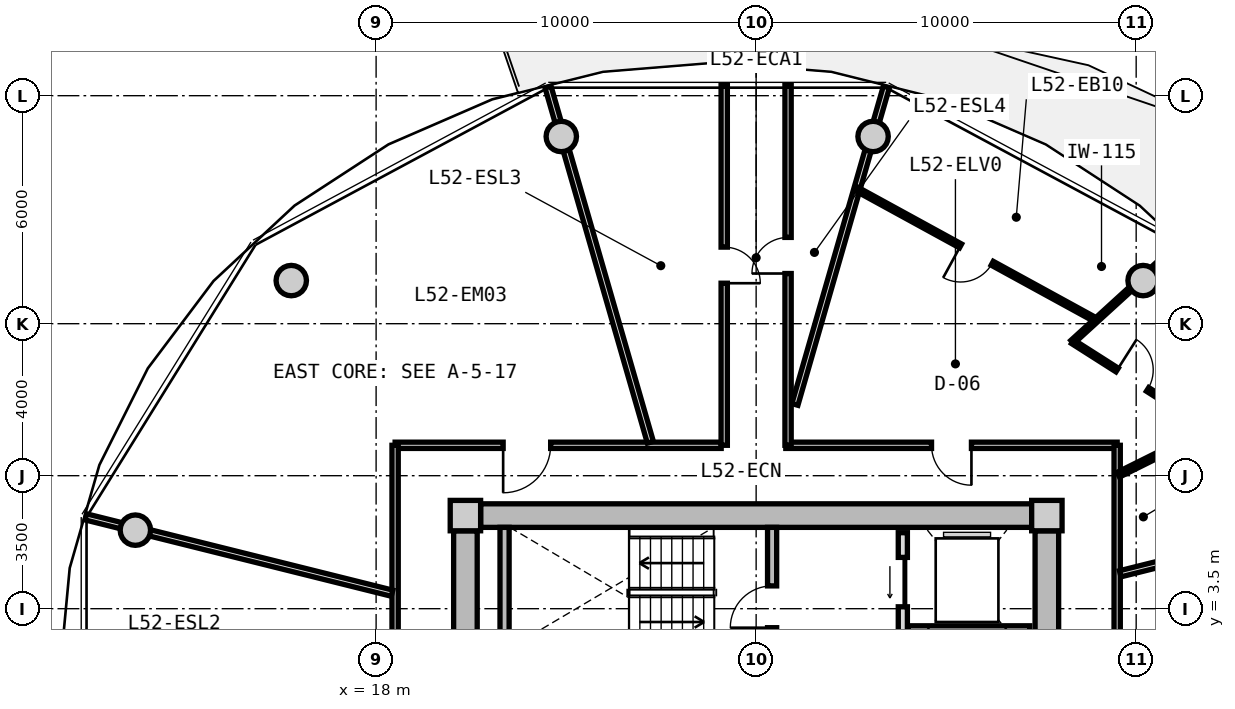
"""IFC4 building model, lengths in metres.
Left out: names, types, materials, properties, quantities, classifications, styles, units other than length and angle.
Written with IfcOpenShell. Run it as: python <this file> out.ifc"""

import sys

from ifc_helpers import new_model, si_unit, direction, frame, frame_2d, origin, origin_2d, place, context, subcontext, project, spatial, rectangle, circle, extrude, source, transform, mapped, element, fill, save


model = new_model("IFC4")
c1 = context("Model", 3, precision=1e-05, world=origin(), true_north=direction((0.0, 1.0)))
c2 = subcontext(c1, "Body", "Model", "MODEL_VIEW")
j1 = project(units=[si_unit("LENGTHUNIT", "METRE"), si_unit("PLANEANGLEUNIT", "RADIAN")], contexts=[c1])
p1 = place(None, origin())
s1 = spatial("IfcSite", under=j1, at=p1, CompositionType="ELEMENT")
p2 = place(p1, origin())
s2 = spatial("IfcBuilding", under=s1, at=p2, CompositionType="ELEMENT")
p3 = place(p2, frame((0.0, 0.0, 167.85)))
s3 = spatial("IfcBuildingStorey", under=s2, at=p3, CompositionType="ELEMENT", Elevation=167.85)
m1 = source(origin(), c2, "Body", "SweptSolid", [
    extrude(rectangle(XDim=0.8, YDim=0.8, at=origin_2d()), origin(), (0.0, 0.0, 1.0), 3.05),
])
for number, where, z_axis, x_axis in (
    (1, (35.65, 5.95, 0.0), (0.0, 0.0, 1.0), (1.0, 0.0, 0.0)),
    (2, (20.35, 5.95, 0.0), (0.0, 0.0, 1.0), (1.0, 0.0, 0.0)),
):
    element("IfcColumn", number, at=place(p3, frame(where, z_axis=z_axis, x_axis=x_axis)), inside=s3, PredefinedType="COLUMN", context=c2, shape_type="MappedRepresentation", body=[
        mapped(m1, transform((0.0, 0.0, 0.0), x_axis=(1.0, 0.0, 0.0), y_axis=(0.0, 1.0, 0.0), z_axis=(0.0, 0.0, 1.0), scale=1.0)),
    ])
m2 = source(origin(), c2, "Body", "SweptSolid", [
    extrude(rectangle(XDim=14.5, YDim=0.62, at=frame_2d((7.25, 0.0))), origin(), (0.0, 0.0, 1.0), 2.81),
])
p4 = place(p3, frame((20.75, 5.95, 0.0), z_axis=(0.0, 0.0, 1.0), x_axis=(1.0, 0.0, 0.0)))
e3 = element("IfcWall", 3, at=p4, inside=s3, PredefinedType="SHEAR", context=c2, shape_type="MappedRepresentation", body=[
    mapped(m2, transform((0.0, 0.0, 0.0), x_axis=(1.0, 0.0, 0.0), y_axis=(0.0, 1.0, 0.0), z_axis=(0.0, 0.0, 1.0), scale=1.0)),
])
m3 = source(origin(), c2, "Body", "SweptSolid", [
    extrude(rectangle(XDim=11.1, YDim=0.62, at=frame_2d((5.55, 0.0))), origin(), (0.0, 0.0, 1.0), 2.81),
])
p5 = place(p3, frame((20.35, -5.55, 0.0), z_axis=(0.0, 0.0, 1.0), x_axis=(0.0, 1.0, 0.0)))
e4 = element("IfcWall", 4, at=p5, inside=s3, PredefinedType="SHEAR", context=c2, shape_type="MappedRepresentation", body=[
    mapped(m3, transform((0.0, 0.0, 0.0), x_axis=(1.0, 0.0, 0.0), y_axis=(0.0, 1.0, 0.0), z_axis=(0.0, 0.0, 1.0), scale=1.0)),
])
p6 = place(p5, frame((3.8, 0.0, 0.0)))
e5 = element("IfcOpeningElement", 5, at=p6, cuts=e4, PredefinedType="OPENING", context=c2, shape_type="SweptSolid", body=[
    extrude(rectangle(XDim=1.2, YDim=2.15, at=frame_2d((0.6, 1.075))), frame((0.0, 0.32, 0.0), z_axis=(0.0, -1.0, 0.0), x_axis=(1.0, 0.0, 0.0)), (0.0, 0.0, 1.0), 0.64),
])
p7 = place(p3, frame((35.65, 5.55, 0.0), z_axis=(0.0, 0.0, 1.0), x_axis=(0.0, -1.0, 0.0)))
e6 = element("IfcWall", 6, at=p7, inside=s3, PredefinedType="SHEAR", context=c2, shape_type="MappedRepresentation", body=[
    mapped(m3, transform((0.0, 0.0, 0.0), x_axis=(1.0, 0.0, 0.0), y_axis=(0.0, 1.0, 0.0), z_axis=(0.0, 0.0, 1.0), scale=1.0)),
])
p8 = place(p7, frame((5.65, 0.0, 0.0)))
e7 = element("IfcOpeningElement", 7, at=p8, cuts=e6, PredefinedType="OPENING", context=c2, shape_type="SweptSolid", body=[
    extrude(rectangle(XDim=1.2, YDim=2.15, at=frame_2d((0.6, 1.075))), frame((0.0, 0.32, 0.0), z_axis=(0.0, -1.0, 0.0), x_axis=(1.0, 0.0, 0.0)), (0.0, 0.0, 1.0), 0.64),
])
p9 = place(p7, frame((9.3, 0.0, 0.0)))
e8 = element("IfcOpeningElement", 8, at=p9, cuts=e6, PredefinedType="OPENING", context=c2, shape_type="SweptSolid", body=[
    extrude(rectangle(XDim=1.0, YDim=2.1, at=frame_2d((0.5, 1.05))), frame((0.0, 0.32, 0.0), z_axis=(0.0, -1.0, 0.0), x_axis=(1.0, 0.0, 0.0)), (0.0, 0.0, 1.0), 0.64),
])
m4 = source(origin(), c2, "Body", "SweptSolid", [
    extrude(circle(Radius=0.4, at=origin_2d()), origin(), (0.0, 0.0, 1.0), 3.05),
])
for number, where, z_axis, x_axis in (
    (9, (38.183, 12.135, 0.0), (0.0, 0.0, 1.0), (1.0, 0.0, 0.0)),
    (10, (31.077, 15.926, 0.0), (0.0, 0.0, 1.0), (1.0, 0.0, 0.0)),
    (11, (22.873, 15.926, 0.0), (0.0, 0.0, 1.0), (1.0, 0.0, 0.0)),
    (12, (15.767, 12.135, 0.0), (0.0, 0.0, 1.0), (1.0, 0.0, 0.0)),
    (13, (11.665, 5.567, 0.0), (0.0, 0.0, 1.0), (1.0, 0.0, 0.0)),
):
    element("IfcColumn", number, at=place(p3, frame(where, z_axis=z_axis, x_axis=x_axis)), inside=s3, PredefinedType="COLUMN", context=c2, shape_type="MappedRepresentation", body=[
        mapped(m4, transform((0.0, 0.0, 0.0), x_axis=(1.0, 0.0, 0.0), y_axis=(0.0, 1.0, 0.0), z_axis=(0.0, 0.0, 1.0), scale=1.0)),
    ])
m5 = source(origin(), c2, "Body", "SweptSolid", [
    extrude(rectangle(XDim=3.19, YDim=0.24, at=frame_2d((1.595, 0.0))), origin(), (0.0, 0.0, 1.0), 2.81),
])
p10 = place(p3, frame((21.38, 2.45, 0.0), z_axis=(0.0, 0.0, 1.0), x_axis=(0.0, 1.0, 0.0)))
e14 = element("IfcWall", 14, at=p10, inside=s3, PredefinedType="PARTITIONING", context=c2, shape_type="MappedRepresentation", body=[
    mapped(m5, transform((0.0, 0.0, 0.0), x_axis=(1.0, 0.0, 0.0), y_axis=(0.0, 1.0, 0.0), z_axis=(0.0, 0.0, 1.0), scale=1.0)),
])
p11 = place(p3, frame((28.42, 2.45, 0.0), z_axis=(0.0, 0.0, 1.0), x_axis=(0.0, 1.0, 0.0)))
e15 = element("IfcWall", 15, at=p11, inside=s3, PredefinedType="PARTITIONING", context=c2, shape_type="MappedRepresentation", body=[
    mapped(m5, transform((0.0, 0.0, 0.0), x_axis=(1.0, 0.0, 0.0), y_axis=(0.0, 1.0, 0.0), z_axis=(0.0, 0.0, 1.0), scale=1.0)),
])
p12 = place(p11, frame((0.55, 0.0, 0.0)))
e16 = element("IfcOpeningElement", 16, at=p12, cuts=e15, PredefinedType="OPENING", context=c2, shape_type="SweptSolid", body=[
    extrude(rectangle(XDim=1.1, YDim=2.15, at=frame_2d((0.55, 1.075))), frame((0.0, 0.13, 0.0), z_axis=(0.0, -1.0, 0.0), x_axis=(1.0, 0.0, 0.0)), (0.0, 0.0, 1.0), 0.26),
])
m6 = source(origin(), c2, "Body", "SweptSolid", [
    extrude(rectangle(XDim=5.0, YDim=0.24, at=frame_2d((2.5, 0.0))), origin(), (0.0, 0.0, 1.0), 2.795),
])
p13 = place(p3, frame((31.86, 0.5, 0.0), z_axis=(0.0, 0.0, 1.0), x_axis=(0.0, 1.0, 0.0)))
e17 = element("IfcWall", 17, at=p13, inside=s3, PredefinedType="PARTITIONING", context=c2, shape_type="MappedRepresentation", body=[
    mapped(m6, transform((0.0, 0.0, 0.0), x_axis=(1.0, 0.0, 0.0), y_axis=(0.0, 1.0, 0.0), z_axis=(0.0, 0.0, 1.0), scale=1.0)),
])
p14 = place(p13, frame((3.05, 0.0, 0.0)))
e18 = element("IfcOpeningElement", 18, at=p14, cuts=e17, PredefinedType="OPENING", context=c2, shape_type="SweptSolid", body=[
    extrude(rectangle(XDim=1.3, YDim=2.2, at=frame_2d((0.65, 1.1))), frame((0.0, 0.13, 0.0), z_axis=(0.0, -1.0, 0.0), x_axis=(1.0, 0.0, 0.0)), (0.0, 0.0, 1.0), 0.26),
])
p15 = place(p13, frame((0.55, 0.0, 0.0)))
e19 = element("IfcOpeningElement", 19, at=p15, cuts=e17, PredefinedType="OPENING", context=c2, shape_type="SweptSolid", body=[
    extrude(rectangle(XDim=1.3, YDim=2.2, at=frame_2d((0.65, 1.1))), frame((0.0, 0.13, 0.0), z_axis=(0.0, -1.0, 0.0), x_axis=(1.0, 0.0, 0.0)), (0.0, 0.0, 1.0), 0.26),
])
m7 = source(origin(), c2, "Body", "SweptSolid", [
    extrude(rectangle(XDim=3.2, YDim=0.2, at=frame_2d((1.6, 0.0))), origin(), (0.0, 0.0, 1.0), 2.795),
])
p16 = place(p3, frame((32.0, 2.95, 0.0), z_axis=(0.0, 0.0, 1.0), x_axis=(1.0, 0.0, 0.0)))
e20 = element("IfcWall", 20, at=p16, inside=s3, PredefinedType="PARTITIONING", context=c2, shape_type="MappedRepresentation", body=[
    mapped(m7, transform((0.0, 0.0, 0.0), x_axis=(1.0, 0.0, 0.0), y_axis=(0.0, 1.0, 0.0), z_axis=(0.0, 0.0, 1.0), scale=1.0)),
])
m8 = source(origin(), c2, "Body", "SweptSolid", [
    extrude(rectangle(XDim=8.58, YDim=0.165, at=frame_2d((4.29, 0.0))), origin(), (0.0, 0.0, 1.0), 2.795),
])
p17 = place(p3, frame((18.5, 7.8, 0.0), z_axis=(0.0, 0.0, 1.0), x_axis=(1.0, 0.0, 0.0)))
e21 = element("IfcWall", 21, at=p17, inside=s3, PredefinedType="PARTITIONING", context=c2, shape_type="MappedRepresentation", body=[
    mapped(m8, transform((0.0, 0.0, 0.0), x_axis=(1.0, 0.0, 0.0), y_axis=(0.0, 1.0, 0.0), z_axis=(0.0, 0.0, 1.0), scale=1.0)),
])
p18 = place(p17, frame((2.843, 0.0, 0.0)))
e22 = element("IfcOpeningElement", 22, at=p18, cuts=e21, PredefinedType="OPENING", context=c2, shape_type="SweptSolid", body=[
    extrude(rectangle(XDim=1.25, YDim=2.2, at=frame_2d((0.625, 1.1))), frame((0.0, 0.093, 0.0), z_axis=(0.0, -1.0, 0.0), x_axis=(1.0, 0.0, 0.0)), (0.0, 0.0, 1.0), 0.185),
])
m9 = source(origin(), c2, "Body", "SweptSolid", [
    extrude(rectangle(XDim=8.719, YDim=0.165, at=frame_2d((4.36, 0.0))), origin(), (0.0, 0.0, 1.0), 2.795),
])
p19 = place(p3, frame((28.781, 7.8, 0.0), z_axis=(0.0, 0.0, 1.0), x_axis=(1.0, 0.0, 0.0)))
e23 = element("IfcWall", 23, at=p19, inside=s3, PredefinedType="PARTITIONING", context=c2, shape_type="MappedRepresentation", body=[
    mapped(m9, transform((0.0, 0.0, 0.0), x_axis=(1.0, 0.0, 0.0), y_axis=(0.0, 1.0, 0.0), z_axis=(0.0, 0.0, 1.0), scale=1.0)),
])
p20 = place(p19, frame((3.835, 0.0, 0.0)))
e24 = element("IfcOpeningElement", 24, at=p20, cuts=e23, PredefinedType="OPENING", context=c2, shape_type="SweptSolid", body=[
    extrude(rectangle(XDim=1.05, YDim=2.15, at=frame_2d((0.525, 1.075))), frame((0.0, 0.093, 0.0), z_axis=(0.0, -1.0, 0.0), x_axis=(1.0, 0.0, 0.0)), (0.0, 0.0, 1.0), 0.185),
])
m10 = source(origin(), c2, "Body", "SweptSolid", [
    extrude(rectangle(XDim=6.88, YDim=0.165, at=frame_2d((3.44, 0.0))), origin(), (0.0, 0.0, 1.0), 2.795),
])
for number, where, z_axis, x_axis in (
    (25, (18.5, 0.92, 0.0), (0.0, 0.0, 1.0), (0.0, 1.0, 0.0)),
    (26, (37.5, 7.8, 0.0), (0.0, 0.0, 1.0), (0.0, -1.0, 0.0)),
):
    element("IfcWall", number, at=place(p3, frame(where, z_axis=z_axis, x_axis=x_axis)), inside=s3, PredefinedType="PARTITIONING", context=c2, shape_type="MappedRepresentation", body=[
        mapped(m10, transform((0.0, 0.0, 0.0), x_axis=(1.0, 0.0, 0.0), y_axis=(0.0, 1.0, 0.0), z_axis=(0.0, 0.0, 1.0), scale=1.0)),
    ])
m11 = source(origin(), c2, "Body", "SweptSolid", [
    extrude(rectangle(XDim=8.695, YDim=0.165, at=frame_2d((4.348, 0.0))), origin(), (0.0, 0.0, 1.0), 2.345),
])
p21 = place(p3, frame((29.02, 8.875, 0.0), z_axis=(0.0, 0.0, 1.0), x_axis=(0.276797231892, 0.960928349263, 0.0)))
e27 = element("IfcWall", 27, at=p21, inside=s3, PredefinedType="PARTITIONING", context=c2, shape_type="MappedRepresentation", body=[
    mapped(m11, transform((0.0, 0.0, 0.0), x_axis=(1.0, 0.0, 0.0), y_axis=(0.0, 1.0, 0.0), z_axis=(0.0, 0.0, 1.0), scale=1.0)),
])
m12 = source(origin(), c2, "Body", "SweptSolid", [
    extrude(rectangle(XDim=9.73, YDim=0.165, at=frame_2d((4.865, 0.0))), origin(), (0.0, 0.0, 1.0), 2.345),
])
p22 = place(p3, frame((25.217, 7.88, 0.0), z_axis=(0.0, 0.0, 1.0), x_axis=(-0.27679492614, 0.960929013436, 0.0)))
e28 = element("IfcWall", 28, at=p22, inside=s3, PredefinedType="PARTITIONING", context=c2, shape_type="MappedRepresentation", body=[
    mapped(m12, transform((0.0, 0.0, 0.0), x_axis=(1.0, 0.0, 0.0), y_axis=(0.0, 1.0, 0.0), z_axis=(0.0, 0.0, 1.0), scale=1.0)),
])
m13 = source(origin(), c2, "Body", "SweptSolid", [
    extrude(rectangle(XDim=8.305, YDim=0.165, at=frame_2d((4.153, 0.0))), origin(), (0.0, 0.0, 1.0), 2.345),
])
p23 = place(p3, frame((18.42, 3.908, 0.0), z_axis=(0.0, 0.0, 1.0), x_axis=(-0.970309994378, 0.241864662175, 0.0)))
e29 = element("IfcWall", 29, at=p23, inside=s3, PredefinedType="PARTITIONING", context=c2, shape_type="MappedRepresentation", body=[
    mapped(m13, transform((0.0, 0.0, 0.0), x_axis=(1.0, 0.0, 0.0), y_axis=(0.0, 1.0, 0.0), z_axis=(0.0, 0.0, 1.0), scale=1.0)),
])
m14 = source(origin(), c2, "Body", "SweptSolid", [
    extrude(rectangle(XDim=6.193, YDim=0.165, at=frame_2d((3.096, 0.0))), origin(), (0.0, 0.0, 1.0), 2.345),
])
p24 = place(p3, frame((37.58, 4.419, 0.0), z_axis=(0.0, 0.0, 1.0), x_axis=(0.970309243466, 0.241867674657, 0.0)))
e30 = element("IfcWall", 30, at=p24, inside=s3, PredefinedType="PARTITIONING", context=c2, shape_type="MappedRepresentation", body=[
    mapped(m14, transform((0.0, 0.0, 0.0), x_axis=(1.0, 0.0, 0.0), y_axis=(0.0, 1.0, 0.0), z_axis=(0.0, 0.0, 1.0), scale=1.0)),
])
m15 = source(origin(), c2, "Body", "SweptSolid", [
    extrude(rectangle(XDim=9.48, YDim=0.165, at=frame_2d((4.74, 0.0))), origin(), (0.0, 0.0, 1.0), 2.795),
])
p25 = place(p3, frame((27.16, 7.8, 0.0), z_axis=(0.0, 0.0, 1.0), x_axis=(0.0, 1.0, 0.0)))
e31 = element("IfcWall", 31, at=p25, inside=s3, PredefinedType="PARTITIONING", context=c2, shape_type="MappedRepresentation", body=[
    mapped(m15, transform((0.0, 0.0, 0.0), x_axis=(1.0, 0.0, 0.0), y_axis=(0.0, 1.0, 0.0), z_axis=(0.0, 0.0, 1.0), scale=1.0)),
])
p26 = place(p25, frame((4.265, 0.0, 0.0)))
e32 = element("IfcOpeningElement", 32, at=p26, cuts=e31, PredefinedType="OPENING", context=c2, shape_type="SweptSolid", body=[
    extrude(rectangle(XDim=0.95, YDim=2.1, at=frame_2d((0.475, 1.05))), frame((0.0, 0.093, 0.0), z_axis=(0.0, -1.0, 0.0), x_axis=(1.0, 0.0, 0.0)), (0.0, 0.0, 1.0), 0.185),
])
p27 = place(p3, frame((28.84, 17.28, 0.0), z_axis=(0.0, 0.0, 1.0), x_axis=(0.0, -1.0, 0.0)))
e33 = element("IfcWall", 33, at=p27, inside=s3, PredefinedType="PARTITIONING", context=c2, shape_type="MappedRepresentation", body=[
    mapped(m15, transform((0.0, 0.0, 0.0), x_axis=(1.0, 0.0, 0.0), y_axis=(0.0, 1.0, 0.0), z_axis=(0.0, 0.0, 1.0), scale=1.0)),
])
p28 = place(p27, frame((4.01, 0.0, 0.0)))
e34 = element("IfcOpeningElement", 34, at=p28, cuts=e33, PredefinedType="OPENING", context=c2, shape_type="SweptSolid", body=[
    extrude(rectangle(XDim=0.95, YDim=2.1, at=frame_2d((0.475, 1.05))), frame((0.0, 0.093, 0.0), z_axis=(0.0, -1.0, 0.0), x_axis=(1.0, 0.0, 0.0)), (0.0, 0.0, 1.0), 0.185),
])
m16 = source(origin(), c2, "Body", "SweptSolid", [
    extrude(rectangle(XDim=7.167, YDim=0.115, at=frame_2d((3.583, 0.0))), origin(), (0.0, 0.0, 1.0), 2.795),
])
p29 = place(p3, frame((36.939, 11.098, 0.0), z_axis=(0.0, 0.0, 1.0), x_axis=(-0.8771628907, 0.480192943699, 0.0)))
e35 = element("IfcWall", 35, at=p29, inside=s3, PredefinedType="PARTITIONING", context=c2, shape_type="MappedRepresentation", body=[
    mapped(m16, transform((0.0, 0.0, 0.0), x_axis=(1.0, 0.0, 0.0), y_axis=(0.0, 1.0, 0.0), z_axis=(0.0, 0.0, 1.0), scale=1.0)),
])
p30 = place(p29, frame((3.108, 0.0, 0.0)))
e36 = element("IfcOpeningElement", 36, at=p30, cuts=e35, PredefinedType="OPENING", context=c2, shape_type="SweptSolid", body=[
    extrude(rectangle(XDim=0.95, YDim=2.1, at=frame_2d((0.475, 1.05))), frame((0.0, 0.067, 0.0), z_axis=(0.0, -1.0, 0.0), x_axis=(1.0, 0.0, 0.0)), (0.0, 0.0, 1.0), 0.135),
])
m17 = source(origin(), c2, "Body", "SweptSolid", [
    extrude(rectangle(XDim=3.814, YDim=0.115, at=frame_2d((1.907, 0.0))), origin(), (0.0, 0.0, 1.0), 2.435),
])
p31 = place(p3, frame((36.319, 10.518, 0.0), z_axis=(0.0, 0.0, 1.0), x_axis=(0.73871962024, 0.674012850524, 0.0)))
e37 = element("IfcWall", 37, at=p31, inside=s3, PredefinedType="PARTITIONING", context=c2, shape_type="MappedRepresentation", body=[
    mapped(m17, transform((0.0, 0.0, 0.0), x_axis=(1.0, 0.0, 0.0), y_axis=(0.0, 1.0, 0.0), z_axis=(0.0, 0.0, 1.0), scale=1.0)),
])
m18 = source(origin(), c2, "Body", "SweptSolid", [
    extrude(rectangle(XDim=1.601, YDim=0.14, at=frame_2d((0.801, 0.0))), origin(), (0.0, 0.0, 1.0), 2.795),
])
p32 = place(p3, frame((37.53, 7.026, 0.0), z_axis=(0.0, 0.0, 1.0), x_axis=(0.895279369592, 0.445505163138, 0.0)))
e38 = element("IfcWall", 38, at=p32, inside=s3, PredefinedType="PARTITIONING", context=c2, shape_type="MappedRepresentation", body=[
    mapped(m18, transform((0.0, 0.0, 0.0), x_axis=(1.0, 0.0, 0.0), y_axis=(0.0, 1.0, 0.0), z_axis=(0.0, 0.0, 1.0), scale=1.0)),
])
m19 = source(origin(), c2, "Body", "SweptSolid", [
    extrude(rectangle(XDim=3.725, YDim=0.115, at=frame_2d((1.863, 0.0))), origin(), (0.0, 0.0, 1.0), 2.795),
])
p33 = place(p3, frame((39.471, 8.525, 0.0), z_axis=(0.0, 0.0, 1.0), x_axis=(-0.843453635564, 0.537201977523, 0.0)))
e39 = element("IfcWall", 39, at=p33, inside=s3, PredefinedType="PARTITIONING", context=c2, shape_type="MappedRepresentation", body=[
    mapped(m19, transform((0.0, 0.0, 0.0), x_axis=(1.0, 0.0, 0.0), y_axis=(0.0, 1.0, 0.0), z_axis=(0.0, 0.0, 1.0), scale=1.0)),
])
p34 = place(p33, frame((1.388, 0.0, 0.0)))
e40 = element("IfcOpeningElement", 40, at=p34, cuts=e39, PredefinedType="OPENING", context=c2, shape_type="SweptSolid", body=[
    extrude(rectangle(XDim=0.95, YDim=2.1, at=frame_2d((0.475, 1.05))), frame((0.0, 0.067, 0.0), z_axis=(0.0, -1.0, 0.0), x_axis=(1.0, 0.0, 0.0)), (0.0, 0.0, 1.0), 0.135),
])
m20 = source(origin(), c2, "Body", "SweptSolid", [
    extrude(rectangle(XDim=1.1, YDim=2.15, at=frame_2d((0.55, 1.075))), frame((0.0, 0.025, 0.0), z_axis=(0.0, -1.0, 0.0), x_axis=(1.0, 0.0, 0.0)), (0.0, 0.0, 1.0), 0.05),
])
p35 = place(p12, origin())
e41 = element("IfcDoor", 41, at=p35, inside=s3, OperationType="SINGLE_SWING_LEFT", PredefinedType="DOOR", context=c2, shape_type="MappedRepresentation", body=[
    mapped(m20, transform((0.0, 0.0, 0.0), x_axis=(1.0, 0.0, 0.0), y_axis=(0.0, 1.0, 0.0), z_axis=(0.0, 0.0, 1.0), scale=1.0)),
])
fill(e16, e41)
m21 = source(origin(), c2, "Body", "SweptSolid", [
    extrude(rectangle(XDim=1.3, YDim=2.2, at=frame_2d((0.65, 1.1))), frame((0.0, 0.025, 0.0), z_axis=(0.0, -1.0, 0.0), x_axis=(1.0, 0.0, 0.0)), (0.0, 0.0, 1.0), 0.05),
])
p36 = place(p14, origin())
e42 = element("IfcDoor", 42, at=p36, inside=s3, OperationType="SLIDING_TO_LEFT", PredefinedType="DOOR", context=c2, shape_type="MappedRepresentation", body=[
    mapped(m21, transform((0.0, 0.0, 0.0), x_axis=(1.0, 0.0, 0.0), y_axis=(0.0, 1.0, 0.0), z_axis=(0.0, 0.0, 1.0), scale=1.0)),
])
fill(e18, e42)
m22 = source(origin(), c2, "Body", "SweptSolid", [
    extrude(rectangle(XDim=0.95, YDim=2.1, at=frame_2d((0.475, 1.05))), frame((0.0, 0.025, 0.0), z_axis=(0.0, -1.0, 0.0), x_axis=(1.0, 0.0, 0.0)), (0.0, 0.0, 1.0), 0.05),
])
p37 = place(p26, frame((0.95, 0.0, 0.0), z_axis=(0.0, 0.0, 1.0), x_axis=(-1.0, 0.0, 0.0)))
e43 = element("IfcDoor", 43, at=p37, inside=s3, OperationType="SINGLE_SWING_RIGHT", PredefinedType="DOOR", context=c2, shape_type="MappedRepresentation", body=[
    mapped(m22, transform((0.0, 0.0, 0.0), x_axis=(1.0, 0.0, 0.0), y_axis=(0.0, 1.0, 0.0), z_axis=(0.0, 0.0, 1.0), scale=1.0)),
])
fill(e32, e43)
p38 = place(p28, frame((0.95, 0.0, 0.0), z_axis=(0.0, 0.0, 1.0), x_axis=(-1.0, 0.0, 0.0)))
e44 = element("IfcDoor", 44, at=p38, inside=s3, OperationType="SINGLE_SWING_LEFT", PredefinedType="DOOR", context=c2, shape_type="MappedRepresentation", body=[
    mapped(m22, transform((0.0, 0.0, 0.0), x_axis=(1.0, 0.0, 0.0), y_axis=(0.0, 1.0, 0.0), z_axis=(0.0, 0.0, 1.0), scale=1.0)),
])
fill(e34, e44)
m23 = source(origin(), c2, "Body", "SweptSolid", [
    extrude(rectangle(XDim=1.05, YDim=2.15, at=frame_2d((0.525, 1.075))), frame((0.0, 0.025, 0.0), z_axis=(0.0, -1.0, 0.0), x_axis=(1.0, 0.0, 0.0)), (0.0, 0.0, 1.0), 0.05),
])
p39 = place(p20, frame((1.05, 0.0, 0.0), z_axis=(0.0, 0.0, 1.0), x_axis=(-1.0, 0.0, 0.0)))
e45 = element("IfcDoor", 45, at=p39, inside=s3, OperationType="SINGLE_SWING_LEFT", PredefinedType="DOOR", context=c2, shape_type="MappedRepresentation", body=[
    mapped(m23, transform((0.0, 0.0, 0.0), x_axis=(1.0, 0.0, 0.0), y_axis=(0.0, 1.0, 0.0), z_axis=(0.0, 0.0, 1.0), scale=1.0)),
])
fill(e24, e45)
p40 = place(p34, frame((0.95, 0.0, 0.0), z_axis=(0.0, 0.0, 1.0), x_axis=(-1.0, 0.0, 0.0)))
e46 = element("IfcDoor", 46, at=p40, inside=s3, OperationType="SINGLE_SWING_LEFT", PredefinedType="DOOR", context=c2, shape_type="MappedRepresentation", body=[
    mapped(m22, transform((0.0, 0.0, 0.0), x_axis=(1.0, 0.0, 0.0), y_axis=(0.0, 1.0, 0.0), z_axis=(0.0, 0.0, 1.0), scale=1.0)),
])
fill(e40, e46)
p41 = place(p30, origin())
e47 = element("IfcDoor", 47, at=p41, inside=s3, OperationType="SINGLE_SWING_RIGHT", PredefinedType="DOOR", context=c2, shape_type="MappedRepresentation", body=[
    mapped(m22, transform((0.0, 0.0, 0.0), x_axis=(1.0, 0.0, 0.0), y_axis=(0.0, 1.0, 0.0), z_axis=(0.0, 0.0, 1.0), scale=1.0)),
])
fill(e36, e47)
m24 = source(origin(), c2, "Body", "SweptSolid", [
    extrude(rectangle(XDim=1.25, YDim=2.2, at=frame_2d((0.625, 1.1))), frame((0.0, 0.025, 0.0), z_axis=(0.0, -1.0, 0.0), x_axis=(1.0, 0.0, 0.0)), (0.0, 0.0, 1.0), 0.05),
])
p42 = place(p18, frame((1.25, 0.0, 0.0), z_axis=(0.0, 0.0, 1.0), x_axis=(-1.0, 0.0, 0.0)))
e48 = element("IfcDoor", 48, at=p42, inside=s3, OperationType="SINGLE_SWING_RIGHT", PredefinedType="DOOR", context=c2, shape_type="MappedRepresentation", body=[
    mapped(m24, transform((0.0, 0.0, 0.0), x_axis=(1.0, 0.0, 0.0), y_axis=(0.0, 1.0, 0.0), z_axis=(0.0, 0.0, 1.0), scale=1.0)),
])
fill(e22, e48)
save(model, sys.argv[1])
